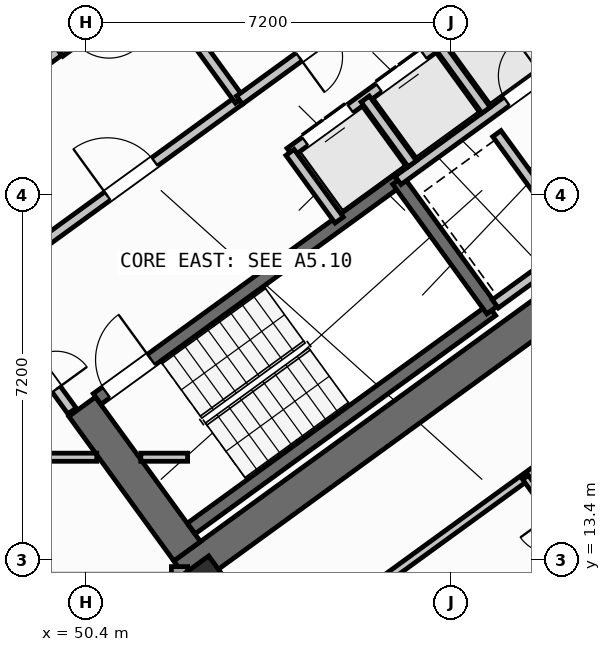
"""IFC4 building model, lengths in metres.
Left out: names, types, materials, properties, quantities, classifications, styles, units other than length and angle.
Written with IfcOpenShell. Run it as: python <this file> out.ifc"""

import sys

from ifc_helpers import new_model, si_unit, direction, frame, frame_2d, origin, origin_2d, place, context, subcontext, project, spatial, rectangle, hollow_rectangle, extrude, source, transform, mapped, element, fill, save


model = new_model("IFC4")
c1 = context("Model", 3, precision=1e-05, world=origin(), true_north=direction((0.0, 1.0)))
c2 = subcontext(c1, "Body", "Model", "MODEL_VIEW")
j1 = project(units=[si_unit("LENGTHUNIT", "METRE"), si_unit("PLANEANGLEUNIT", "RADIAN")], contexts=[c1])
p1 = place(None, origin())
s1 = spatial("IfcSite", under=j1, at=p1, CompositionType="ELEMENT")
p2 = place(p1, origin())
s2 = spatial("IfcBuilding", under=s1, at=p2, CompositionType="ELEMENT")
p3 = place(p2, frame((0.0, 0.0, 52.8)))
s3 = spatial("IfcBuildingStorey", under=s2, at=p3, CompositionType="ELEMENT", Elevation=52.8)
p4 = place(p3, frame((52.318, 13.11, 0.0), z_axis=(0.0, 0.0, 1.0), x_axis=(0.809019445368, 0.587781878776, 0.0)))
e1 = element("IfcWall", 1, at=p4, inside=s3, PredefinedType="SHEAR", context=c2, shape_type="SweptSolid", body=[
    extrude(rectangle(XDim=12.44, YDim=0.65, at=frame_2d((6.22, 0.0))), origin(), (0.0, 0.0, 1.0), 3.35),
])
p5 = place(p3, frame((52.39, 13.564, 0.0), z_axis=(0.0, 0.0, 1.0), x_axis=(-0.58779688989, 0.809008539037, 0.0)))
e2 = element("IfcWall", 2, at=p5, inside=s3, PredefinedType="SHEAR", context=c2, shape_type="SweptSolid", body=[
    extrude(rectangle(XDim=3.525, YDim=0.65, at=frame_2d((1.763, 0.0))), origin(), (0.0, 0.0, 1.0), 3.35),
])
m1 = source(origin(), c2, "Body", "SweptSolid", [
    extrude(hollow_rectangle(XDim=1.0, YDim=1.0, WallThickness=0.04, at=origin_2d()), origin(), (0.0, 0.0, 1.0), 3.6),
])
p6 = place(p3, frame((52.705, 12.773, 0.0), z_axis=(0.0, 0.0, 1.0), x_axis=(0.809016994375, 0.587785252292, 0.0)))
e3 = element("IfcColumn", 3, at=p6, inside=s3, PredefinedType="COLUMN", context=c2, shape_type="MappedRepresentation", body=[
    mapped(m1, transform((0.0, 0.0, 0.0), scale=1.0)),
])
p7 = place(p3, frame((58.455, 35.484, 0.0), z_axis=(0.0, 0.0, 1.0), x_axis=(0.587783625747, -0.809018176127, 0.0)))
e4 = element("IfcWall", 4, at=p7, inside=s3, PredefinedType="STANDARD", context=c2, shape_type="SweptSolid", body=[
    extrude(rectangle(XDim=21.587, YDim=0.32, at=frame_2d((10.794, 0.0))), origin(), (0.0, 0.0, 1.0), 2.725),
])
p8 = place(p7, frame((1.5, 0.0, 0.8)))
e5 = element("IfcOpeningElement", 5, at=p8, cuts=e4, PredefinedType="OPENING", context=c2, shape_type="SweptSolid", body=[
    extrude(rectangle(XDim=2.1, YDim=1.55, at=frame_2d((1.05, 0.775))), frame((0.0, 0.17, 0.0), z_axis=(0.0, -1.0, 0.0), x_axis=(1.0, 0.0, 0.0)), (0.0, 0.0, 1.0), 0.34),
])
p9 = place(p7, frame((5.105, 0.0, 0.85)))
e6 = element("IfcOpeningElement", 6, at=p9, cuts=e4, PredefinedType="OPENING", context=c2, shape_type="SweptSolid", body=[
    extrude(rectangle(XDim=1.5, YDim=1.5, at=frame_2d((0.75, 0.75))), frame((0.0, 0.17, 0.0), z_axis=(0.0, -1.0, 0.0), x_axis=(1.0, 0.0, 0.0)), (0.0, 0.0, 1.0), 0.34),
])
p10 = place(p7, frame((8.954, 0.0, 0.85)))
e7 = element("IfcOpeningElement", 7, at=p10, cuts=e4, PredefinedType="OPENING", context=c2, shape_type="SweptSolid", body=[
    extrude(rectangle(XDim=1.5, YDim=1.5, at=frame_2d((0.75, 0.75))), frame((0.0, 0.17, 0.0), z_axis=(0.0, -1.0, 0.0), x_axis=(1.0, 0.0, 0.0)), (0.0, 0.0, 1.0), 0.34),
])
p11 = place(p7, frame((17.581, 0.0, 0.95)))
e8 = element("IfcOpeningElement", 8, at=p11, cuts=e4, PredefinedType="OPENING", context=c2, shape_type="SweptSolid", body=[
    extrude(rectangle(XDim=1.2, YDim=1.4, at=frame_2d((0.6, 0.7))), frame((0.0, 0.17, 0.0), z_axis=(0.0, -1.0, 0.0), x_axis=(1.0, 0.0, 0.0)), (0.0, 0.0, 1.0), 0.34),
])
p12 = place(p3, frame((71.098, 17.731, 0.0), z_axis=(0.0, 0.0, 1.0), x_axis=(-0.809021120468, -0.587779573171, 0.0)))
e9 = element("IfcWall", 9, at=p12, inside=s3, PredefinedType="STANDARD", context=c2, shape_type="SweptSolid", body=[
    extrude(rectangle(XDim=17.588, YDim=0.32, at=frame_2d((8.794, 0.0))), origin(), (0.0, 0.0, 1.0), 3.35),
])
p13 = place(p12, frame((1.624, 0.0, 0.0)))
e10 = element("IfcOpeningElement", 10, at=p13, cuts=e9, PredefinedType="OPENING", context=c2, shape_type="SweptSolid", body=[
    extrude(rectangle(XDim=1.05, YDim=2.15, at=frame_2d((0.525, 1.075))), frame((0.0, 0.17, 0.0), z_axis=(0.0, -1.0, 0.0), x_axis=(1.0, 0.0, 0.0)), (0.0, 0.0, 1.0), 0.34),
])
p14 = place(p12, frame((4.104, 0.0, 1.0)))
e11 = element("IfcOpeningElement", 11, at=p14, cuts=e9, PredefinedType="OPENING", context=c2, shape_type="SweptSolid", body=[
    extrude(rectangle(XDim=0.9, YDim=1.25, at=frame_2d((0.45, 0.625))), frame((0.0, 0.17, 0.0), z_axis=(0.0, -1.0, 0.0), x_axis=(1.0, 0.0, 0.0)), (0.0, 0.0, 1.0), 0.34),
])
p15 = place(p12, frame((7.879, 0.0, 0.85)))
e12 = element("IfcOpeningElement", 12, at=p15, cuts=e9, PredefinedType="OPENING", context=c2, shape_type="SweptSolid", body=[
    extrude(rectangle(XDim=1.8, YDim=1.5, at=frame_2d((0.9, 0.75))), frame((0.0, 0.17, 0.0), z_axis=(0.0, -1.0, 0.0), x_axis=(1.0, 0.0, 0.0)), (0.0, 0.0, 1.0), 0.34),
])
p16 = place(p12, frame((12.849, 0.0, 0.85)))
e13 = element("IfcOpeningElement", 13, at=p16, cuts=e9, PredefinedType="OPENING", context=c2, shape_type="SweptSolid", body=[
    extrude(rectangle(XDim=1.8, YDim=1.5, at=frame_2d((0.9, 0.75))), frame((0.0, 0.17, 0.0), z_axis=(0.0, -1.0, 0.0), x_axis=(1.0, 0.0, 0.0)), (0.0, 0.0, 1.0), 0.34),
])
p17 = place(p3, frame((52.24, 13.261, 0.0), z_axis=(0.0, 0.0, 1.0), x_axis=(0.0, -1.0, 0.0)))
e14 = element("IfcWall", 14, at=p17, inside=s3, PredefinedType="STANDARD", context=c2, shape_type="SweptSolid", body=[
    extrude(rectangle(XDim=9.795, YDim=0.32, at=frame_2d((4.897, 0.0))), origin(), (0.0, 0.0, 1.0), 3.35),
])
p18 = place(p17, frame((2.349, 0.0, 0.8)))
e15 = element("IfcOpeningElement", 15, at=p18, cuts=e14, PredefinedType="OPENING", context=c2, shape_type="SweptSolid", body=[
    extrude(rectangle(XDim=2.1, YDim=1.55, at=frame_2d((1.05, 0.775))), frame((0.0, 0.17, 0.0), z_axis=(0.0, -1.0, 0.0), x_axis=(1.0, 0.0, 0.0)), (0.0, 0.0, 1.0), 0.34),
])
p19 = place(p17, frame((7.03, 0.0, 0.85)))
e16 = element("IfcOpeningElement", 16, at=p19, cuts=e14, PredefinedType="OPENING", context=c2, shape_type="SweptSolid", body=[
    extrude(rectangle(XDim=1.8, YDim=1.5, at=frame_2d((0.9, 0.75))), frame((0.0, 0.17, 0.0), z_axis=(0.0, -1.0, 0.0), x_axis=(1.0, 0.0, 0.0)), (0.0, 0.0, 1.0), 0.34),
])
p20 = place(p3, frame((49.863, 23.44, 0.0), z_axis=(0.0, 0.0, 1.0), x_axis=(0.809003474932, 0.587803859759, 0.0)))
e17 = element("IfcWall", 17, at=p20, inside=s3, PredefinedType="SHEAR", context=c2, shape_type="SweptSolid", body=[
    extrude(rectangle(XDim=7.46, YDim=0.26, at=frame_2d((3.73, 0.0))), origin(), (0.0, 0.0, 1.0), 3.35),
])
p21 = place(p20, frame((0.36, 0.0, 0.0)))
e18 = element("IfcOpeningElement", 18, at=p21, cuts=e17, PredefinedType="OPENING", context=c2, shape_type="SweptSolid", body=[
    extrude(rectangle(XDim=0.86, YDim=2.05, at=frame_2d((0.43, 1.025))), frame((0.0, 0.14, 0.0), z_axis=(0.0, -1.0, 0.0), x_axis=(1.0, 0.0, 0.0)), (0.0, 0.0, 1.0), 0.28),
])
p22 = place(p3, frame((49.855, 23.434, 0.0), z_axis=(0.0, 0.0, 1.0), x_axis=(-0.58776738483, 0.809029975545, 0.0)))
e19 = element("IfcWall", 19, at=p22, inside=s3, PredefinedType="SHEAR", context=c2, shape_type="SweptSolid", body=[
    extrude(rectangle(XDim=3.16, YDim=0.26, at=frame_2d((1.58, 0.0))), origin(), (0.0, 0.0, 1.0), 3.35),
])
p23 = place(p3, frame((52.472, 14.013, 0.0), z_axis=(0.0, 0.0, 1.0), x_axis=(0.809028366311, 0.587769599847, 0.0)))
e20 = element("IfcWall", 20, at=p23, inside=s3, PredefinedType="SHEAR", context=c2, shape_type="SweptSolid", body=[
    extrude(rectangle(XDim=7.33, YDim=0.26, at=frame_2d((3.665, 0.0))), origin(), (0.0, 0.0, 1.0), 3.35),
])
p24 = place(p3, frame((50.615, 16.57, 0.0), z_axis=(0.0, 0.0, 1.0), x_axis=(0.809028366311, 0.587769599847, 0.0)))
e21 = element("IfcWall", 21, at=p24, inside=s3, PredefinedType="SHEAR", context=c2, shape_type="SweptSolid", body=[
    extrude(rectangle(XDim=7.33, YDim=0.26, at=frame_2d((3.665, 0.0))), origin(), (0.0, 0.0, 1.0), 3.35),
])
p25 = place(p24, frame((0.22, 0.0, 0.0)))
e22 = element("IfcOpeningElement", 22, at=p25, cuts=e21, PredefinedType="OPENING", context=c2, shape_type="SweptSolid", body=[
    extrude(rectangle(XDim=1.1, YDim=2.1, at=frame_2d((0.55, 1.05))), frame((0.0, 0.14, 0.0), z_axis=(0.0, -1.0, 0.0), x_axis=(1.0, 0.0, 0.0)), (0.0, 0.0, 1.0), 0.28),
])
p26 = place(p3, frame((58.41, 18.327, 0.0), z_axis=(0.0, 0.0, 1.0), x_axis=(-0.58776738483, 0.809029975545, 0.0)))
e23 = element("IfcWall", 23, at=p26, inside=s3, PredefinedType="SHEAR", context=c2, shape_type="SweptSolid", body=[
    extrude(rectangle(XDim=3.16, YDim=0.26, at=frame_2d((1.58, 0.0))), origin(), (0.0, 0.0, 1.0), 3.35),
])
p27 = place(p3, frame((47.106, 21.437, 0.0), z_axis=(0.0, 0.0, 1.0), x_axis=(0.809012514015, 0.58779141893, 0.0)))
e24 = element("IfcWall", 24, at=p27, inside=s3, PredefinedType="STANDARD", context=c2, shape_type="SweptSolid", body=[
    extrude(rectangle(XDim=3.398, YDim=0.2, at=frame_2d((1.699, 0.0))), origin(), (0.0, 0.0, 1.0), 3.34),
])
p28 = place(p27, frame((0.408, 0.0, 0.0)))
e25 = element("IfcOpeningElement", 25, at=p28, cuts=e24, PredefinedType="OPENING", context=c2, shape_type="SweptSolid", body=[
    extrude(rectangle(XDim=1.3, YDim=2.2, at=frame_2d((0.65, 1.1))), frame((0.0, 0.11, 0.0), z_axis=(0.0, -1.0, 0.0), x_axis=(1.0, 0.0, 0.0)), (0.0, 0.0, 1.0), 0.22),
])
p29 = place(p3, frame((48.799, 19.107, 0.0), z_axis=(0.0, 0.0, 1.0), x_axis=(0.809012959416, 0.587790805897, 0.0)))
e26 = element("IfcWall", 26, at=p29, inside=s3, PredefinedType="STANDARD", context=c2, shape_type="SweptSolid", body=[
    extrude(rectangle(XDim=5.718, YDim=0.2, at=frame_2d((2.859, 0.0))), origin(), (0.0, 0.0, 1.0), 3.34),
])
p30 = place(p29, frame((2.498, 0.0, 0.0)))
e27 = element("IfcOpeningElement", 27, at=p30, cuts=e26, PredefinedType="OPENING", context=c2, shape_type="SweptSolid", body=[
    extrude(rectangle(XDim=1.15, YDim=2.1, at=frame_2d((0.575, 1.05))), frame((0.0, 0.11, 0.0), z_axis=(0.0, -1.0, 0.0), x_axis=(1.0, 0.0, 0.0)), (0.0, 0.0, 1.0), 0.22),
])
p31 = place(p3, frame((56.553, 20.884, 0.0), z_axis=(0.0, 0.0, 1.0), x_axis=(0.809035789462, 0.587759382205, 0.0)))
e28 = element("IfcWall", 28, at=p31, inside=s3, PredefinedType="STANDARD", context=c2, shape_type="SweptSolid", body=[
    extrude(rectangle(XDim=3.768, YDim=0.2, at=frame_2d((1.884, 0.0))), origin(), (0.0, 0.0, 1.0), 3.34),
])
p32 = place(p31, frame((2.65, 0.0, 0.0)))
e29 = element("IfcOpeningElement", 29, at=p32, cuts=e28, PredefinedType="OPENING", context=c2, shape_type="SweptSolid", body=[
    extrude(rectangle(XDim=0.86, YDim=2.05, at=frame_2d((0.43, 1.025))), frame((0.0, 0.11, 0.0), z_axis=(0.0, -1.0, 0.0), x_axis=(1.0, 0.0, 0.0)), (0.0, 0.0, 1.0), 0.22),
])
p33 = place(p3, frame((54.421, 21.436, 0.0), z_axis=(0.0, 0.0, 1.0), x_axis=(0.809013710463, 0.587789772183, 0.0)))
e30 = element("IfcWall", 30, at=p33, inside=s3, PredefinedType="STANDARD", context=c2, shape_type="SweptSolid", body=[
    extrude(rectangle(XDim=5.36, YDim=0.2, at=frame_2d((2.68, 0.0))), origin(), (0.0, 0.0, 1.0), 3.34),
])
p34 = place(p33, frame((0.37, 0.0, 0.0)))
e31 = element("IfcOpeningElement", 31, at=p34, cuts=e30, PredefinedType="OPENING", context=c2, shape_type="SweptSolid", body=[
    extrude(rectangle(XDim=1.1, YDim=2.15, at=frame_2d((0.55, 1.075))), frame((0.0, 0.11, 0.0), z_axis=(0.0, -1.0, 0.0), x_axis=(1.0, 0.0, 0.0)), (0.0, 0.0, 1.0), 0.22),
])
p35 = place(p33, frame((2.17, 0.0, 0.0)))
e32 = element("IfcOpeningElement", 32, at=p35, cuts=e30, PredefinedType="OPENING", context=c2, shape_type="SweptSolid", body=[
    extrude(rectangle(XDim=1.1, YDim=2.15, at=frame_2d((0.55, 1.075))), frame((0.0, 0.11, 0.0), z_axis=(0.0, -1.0, 0.0), x_axis=(1.0, 0.0, 0.0)), (0.0, 0.0, 1.0), 0.22),
])
p36 = place(p33, frame((3.97, 0.0, 0.0)))
e33 = element("IfcOpeningElement", 33, at=p36, cuts=e30, PredefinedType="OPENING", context=c2, shape_type="SweptSolid", body=[
    extrude(rectangle(XDim=1.1, YDim=2.15, at=frame_2d((0.55, 1.075))), frame((0.0, 0.11, 0.0), z_axis=(0.0, -1.0, 0.0), x_axis=(1.0, 0.0, 0.0)), (0.0, 0.0, 1.0), 0.22),
])
p37 = place(p3, frame((55.391, 20.102, 0.0), z_axis=(0.0, 0.0, 1.0), x_axis=(-0.58778447739, 0.809017557374, 0.0)))
e34 = element("IfcWall", 34, at=p37, inside=s3, PredefinedType="STANDARD", context=c2, shape_type="SweptSolid", body=[
    extrude(rectangle(XDim=1.65, YDim=0.2, at=frame_2d((0.825, 0.0))), origin(), (0.0, 0.0, 1.0), 3.34),
])
p38 = place(p3, frame((56.834, 21.212, 0.0), z_axis=(0.0, 0.0, 1.0), x_axis=(-0.58776738483, 0.809029975545, 0.0)))
e35 = element("IfcWall", 35, at=p38, inside=s3, PredefinedType="STANDARD", context=c2, shape_type="SweptSolid", body=[
    extrude(rectangle(XDim=1.58, YDim=0.2, at=frame_2d((0.79, 0.0))), origin(), (0.0, 0.0, 1.0), 3.34),
])
p39 = place(p3, frame((58.29, 22.27, 0.0), z_axis=(0.0, 0.0, 1.0), x_axis=(-0.587840865826, 0.808976585857, 0.0)))
e36 = element("IfcWall", 36, at=p39, inside=s3, PredefinedType="STANDARD", context=c2, shape_type="SweptSolid", body=[
    extrude(rectangle(XDim=1.58, YDim=0.2, at=frame_2d((0.79, 0.0))), origin(), (0.0, 0.0, 1.0), 3.34),
])
p40 = place(p3, frame((60.067, 19.655, 0.0), z_axis=(0.0, 0.0, 1.0), x_axis=(-0.587800520745, 0.809005900975, 0.0)))
e37 = element("IfcWall", 37, at=p40, inside=s3, PredefinedType="STANDARD", context=c2, shape_type="SweptSolid", body=[
    extrude(rectangle(XDim=2.66, YDim=0.2, at=frame_2d((1.33, 0.0))), origin(), (0.0, 0.0, 1.0), 3.34),
])
p41 = place(p3, frame((58.472, 18.447, 0.0), z_axis=(0.0, 0.0, 1.0), x_axis=(0.809022487728, 0.587777691266, 0.0)))
e38 = element("IfcWall", 38, at=p41, inside=s3, PredefinedType="STANDARD", context=c2, shape_type="SweptSolid", body=[
    extrude(rectangle(XDim=3.648, YDim=0.2, at=frame_2d((1.824, 0.0))), origin(), (0.0, 0.0, 1.0), 3.34),
])
p42 = place(p3, frame((53.425, 22.468, 0.0), z_axis=(0.0, 0.0, 1.0), x_axis=(-0.5877230039, 0.809062216821, 0.0)))
e39 = element("IfcWall", 39, at=p42, inside=s3, PredefinedType="STANDARD", context=c2, shape_type="SweptSolid", body=[
    extrude(rectangle(XDim=2.88, YDim=0.2, at=frame_2d((1.44, 0.0))), origin(), (0.0, 0.0, 1.0), 3.34),
])
p43 = place(p3, frame((53.425, 22.468, 0.0), z_axis=(0.0, 0.0, 1.0), x_axis=(0.80902705128, 0.587771409902, 0.0)))
e40 = element("IfcWall", 40, at=p43, inside=s3, PredefinedType="STANDARD", context=c2, shape_type="SweptSolid", body=[
    extrude(rectangle(XDim=5.368, YDim=0.2, at=frame_2d((2.684, 0.0))), origin(), (0.0, 0.0, 1.0), 3.34),
])
p44 = place(p43, frame((4.28, 0.0, 0.0)))
e41 = element("IfcOpeningElement", 41, at=p44, cuts=e40, PredefinedType="OPENING", context=c2, shape_type="SweptSolid", body=[
    extrude(rectangle(XDim=0.86, YDim=2.05, at=frame_2d((0.43, 1.025))), frame((0.0, 0.11, 0.0), z_axis=(0.0, -1.0, 0.0), x_axis=(1.0, 0.0, 0.0)), (0.0, 0.0, 1.0), 0.22),
])
p45 = place(p43, frame((1.45, 0.0, 0.0)))
e42 = element("IfcOpeningElement", 42, at=p45, cuts=e40, PredefinedType="OPENING", context=c2, shape_type="SweptSolid", body=[
    extrude(rectangle(XDim=0.86, YDim=2.05, at=frame_2d((0.43, 1.025))), frame((0.0, 0.11, 0.0), z_axis=(0.0, -1.0, 0.0), x_axis=(1.0, 0.0, 0.0)), (0.0, 0.0, 1.0), 0.22),
])
p46 = place(p3, frame((35.296, 15.42, 0.0), z_axis=(0.0, 0.0, 1.0), x_axis=(1.0, 0.0, 0.0)))
e43 = element("IfcWall", 43, at=p46, inside=s3, PredefinedType="PARTITIONING", context=c2, shape_type="SweptSolid", body=[
    extrude(rectangle(XDim=15.311, YDim=0.16, at=frame_2d((7.655, 0.0))), origin(), (0.0, 0.0, 1.0), 3.34),
])
p47 = place(p46, frame((0.615, 0.0, 0.0)))
e44 = element("IfcOpeningElement", 44, at=p47, cuts=e43, PredefinedType="OPENING", context=c2, shape_type="SweptSolid", body=[
    extrude(rectangle(XDim=1.0, YDim=2.1, at=frame_2d((0.5, 1.05))), frame((0.0, 0.09, 0.0), z_axis=(0.0, -1.0, 0.0), x_axis=(1.0, 0.0, 0.0)), (0.0, 0.0, 1.0), 0.18),
])
p48 = place(p46, frame((9.035, 0.0, 0.0)))
e45 = element("IfcOpeningElement", 45, at=p48, cuts=e43, PredefinedType="OPENING", context=c2, shape_type="SweptSolid", body=[
    extrude(rectangle(XDim=1.0, YDim=2.1, at=frame_2d((0.5, 1.05))), frame((0.0, 0.09, 0.0), z_axis=(0.0, -1.0, 0.0), x_axis=(1.0, 0.0, 0.0)), (0.0, 0.0, 1.0), 0.18),
])
p49 = place(p3, frame((51.477, 15.42, 0.0), z_axis=(0.0, 0.0, 1.0), x_axis=(1.0, 0.0, 0.0)))
e46 = element("IfcWall", 46, at=p49, inside=s3, PredefinedType="PARTITIONING", context=c2, shape_type="SweptSolid", body=[
    extrude(rectangle(XDim=0.923, YDim=0.16, at=frame_2d((0.461, 0.0))), origin(), (0.0, 0.0, 1.0), 3.34),
])
p50 = place(p3, frame((50.119, 16.333, 0.0), z_axis=(0.0, 0.0, 1.0), x_axis=(-0.587749856981, 0.809042709391, 0.0)))
e47 = element("IfcWall", 47, at=p50, inside=s3, PredefinedType="STANDARD", context=c2, shape_type="SweptSolid", body=[
    extrude(rectangle(XDim=2.96, YDim=0.2, at=frame_2d((1.48, 0.0))), origin(), (0.0, 0.0, 1.0), 3.34),
])
p51 = place(p50, frame((0.53, 0.0, 0.0)))
e48 = element("IfcOpeningElement", 48, at=p51, cuts=e47, PredefinedType="OPENING", context=c2, shape_type="SweptSolid", body=[
    extrude(rectangle(XDim=1.5, YDim=2.15, at=frame_2d((0.75, 1.075))), frame((0.0, 0.11, 0.0), z_axis=(0.0, -1.0, 0.0), x_axis=(1.0, 0.0, 0.0)), (0.0, 0.0, 1.0), 0.22),
])
p52 = place(p3, frame((59.827, 23.386, 0.0), z_axis=(0.0, 0.0, 1.0), x_axis=(-0.587803840107, 0.809003489211, 0.0)))
e49 = element("IfcWall", 49, at=p52, inside=s3, PredefinedType="STANDARD", context=c2, shape_type="SweptSolid", body=[
    extrude(rectangle(XDim=2.96, YDim=0.2, at=frame_2d((1.48, 0.0))), origin(), (0.0, 0.0, 1.0), 3.34),
])
p53 = place(p52, frame((1.68, 0.0, 0.0)))
e50 = element("IfcOpeningElement", 50, at=p53, cuts=e49, PredefinedType="OPENING", context=c2, shape_type="SweptSolid", body=[
    extrude(rectangle(XDim=1.0, YDim=2.1, at=frame_2d((0.5, 1.05))), frame((0.0, 0.11, 0.0), z_axis=(0.0, -1.0, 0.0), x_axis=(1.0, 0.0, 0.0)), (0.0, 0.0, 1.0), 0.22),
])
p54 = place(p3, frame((53.705, 11.126, 0.0), z_axis=(0.0, 0.0, 1.0), x_axis=(0.809014504436, 0.587788679384, 0.0)))
e51 = element("IfcWall", 51, at=p54, inside=s3, PredefinedType="PARTITIONING", context=c2, shape_type="SweptSolid", body=[
    extrude(rectangle(XDim=14.67, YDim=0.16, at=frame_2d((7.335, 0.0))), origin(), (0.0, 0.0, 1.0), 3.34),
])
p55 = place(p54, frame((10.2, 0.0, 0.0)))
e52 = element("IfcOpeningElement", 52, at=p55, cuts=e51, PredefinedType="OPENING", context=c2, shape_type="SweptSolid", body=[
    extrude(rectangle(XDim=1.0, YDim=2.1, at=frame_2d((0.5, 1.05))), frame((0.0, 0.09, 0.0), z_axis=(0.0, -1.0, 0.0), x_axis=(1.0, 0.0, 0.0)), (0.0, 0.0, 1.0), 0.18),
])
p56 = place(p3, frame((56.249, 9.785, 0.0), z_axis=(0.0, 0.0, 1.0), x_axis=(0.809011747655, 0.587792473715, 0.0)))
e53 = element("IfcWall", 53, at=p56, inside=s3, PredefinedType="PLUMBINGWALL", context=c2, shape_type="SweptSolid", body=[
    extrude(rectangle(XDim=13.4, YDim=0.14, at=frame_2d((6.7, 0.0))), origin(), (0.0, 0.0, 1.0), 3.34),
])
p57 = place(p56, frame((8.94, 0.0, 0.0)))
e54 = element("IfcOpeningElement", 54, at=p57, cuts=e53, PredefinedType="OPENING", context=c2, shape_type="SweptSolid", body=[
    extrude(rectangle(XDim=0.92, YDim=2.08, at=frame_2d((0.46, 1.04))), frame((0.0, 0.08, 0.0), z_axis=(0.0, -1.0, 0.0), x_axis=(1.0, 0.0, 0.0)), (0.0, 0.0, 1.0), 0.16),
])
p58 = place(p3, frame((60.585, 12.936, 0.0), z_axis=(0.0, 0.0, 1.0), x_axis=(-0.587772116736, 0.809026537752, 0.0)))
e55 = element("IfcWall", 55, at=p58, inside=s3, PredefinedType="PLUMBINGWALL", context=c2, shape_type="SweptSolid", body=[
    extrude(rectangle(XDim=2.58, YDim=0.14, at=frame_2d((1.29, 0.0))), origin(), (0.0, 0.0, 1.0), 3.34),
])
p59 = place(p58, frame((0.9, 0.0, 0.0)))
e56 = element("IfcOpeningElement", 56, at=p59, cuts=e55, PredefinedType="OPENING", context=c2, shape_type="SweptSolid", body=[
    extrude(rectangle(XDim=0.78, YDim=2.05, at=frame_2d((0.39, 1.025))), frame((0.0, 0.08, 0.0), z_axis=(0.0, -1.0, 0.0), x_axis=(1.0, 0.0, 0.0)), (0.0, 0.0, 1.0), 0.16),
])
m2 = source(origin(), c2, "Body", "SweptSolid", [
    extrude(rectangle(XDim=1.1, YDim=2.1, at=frame_2d((0.55, 1.05))), frame((0.0, 0.025, 0.0), z_axis=(0.0, -1.0, 0.0), x_axis=(1.0, 0.0, 0.0)), (0.0, 0.0, 1.0), 0.05),
])
p60 = place(p25, origin())
e57 = element("IfcDoor", 57, at=p60, inside=s3, OperationType="SINGLE_SWING_RIGHT", PredefinedType="DOOR", context=c2, shape_type="MappedRepresentation", body=[
    mapped(m2, transform((0.0, 0.0, 0.0), scale=1.0)),
])
fill(e22, e57)
m3 = source(origin(), c2, "Body", "SweptSolid", [
    extrude(rectangle(XDim=1.15, YDim=2.1, at=frame_2d((0.575, 1.05))), frame((0.0, 0.025, 0.0), z_axis=(0.0, -1.0, 0.0), x_axis=(1.0, 0.0, 0.0)), (0.0, 0.0, 1.0), 0.05),
])
p61 = place(p30, origin())
e58 = element("IfcDoor", 58, at=p61, inside=s3, OperationType="SINGLE_SWING_LEFT", PredefinedType="DOOR", context=c2, shape_type="MappedRepresentation", body=[
    mapped(m3, transform((0.0, 0.0, 0.0), scale=1.0)),
])
fill(e27, e58)
m4 = source(origin(), c2, "Body", "SweptSolid", [
    extrude(rectangle(XDim=1.1, YDim=2.15, at=frame_2d((0.55, 1.075))), frame((0.0, 0.025, 0.0), z_axis=(0.0, -1.0, 0.0), x_axis=(1.0, 0.0, 0.0)), (0.0, 0.0, 1.0), 0.05),
])
p62 = place(p34, origin())
e59 = element("IfcDoor", 59, at=p62, inside=s3, OperationType="DOUBLE_DOOR_SLIDING", PredefinedType="DOOR", context=c2, shape_type="MappedRepresentation", body=[
    mapped(m4, transform((0.0, 0.0, 0.0), scale=1.0)),
])
fill(e31, e59)
p63 = place(p35, origin())
e60 = element("IfcDoor", 60, at=p63, inside=s3, OperationType="DOUBLE_DOOR_SLIDING", PredefinedType="DOOR", context=c2, shape_type="MappedRepresentation", body=[
    mapped(m4, transform((0.0, 0.0, 0.0), scale=1.0)),
])
fill(e32, e60)
m5 = source(origin(), c2, "Body", "SweptSolid", [
    extrude(rectangle(XDim=0.86, YDim=2.05, at=frame_2d((0.43, 1.025))), frame((0.0, 0.025, 0.0), z_axis=(0.0, -1.0, 0.0), x_axis=(1.0, 0.0, 0.0)), (0.0, 0.0, 1.0), 0.05),
])
p64 = place(p32, origin())
e61 = element("IfcDoor", 61, at=p64, inside=s3, OperationType="SINGLE_SWING_RIGHT", PredefinedType="DOOR", context=c2, shape_type="MappedRepresentation", body=[
    mapped(m5, transform((0.0, 0.0, 0.0), scale=1.0)),
])
fill(e29, e61)
p65 = place(p45, frame((0.86, 0.0, 0.0), z_axis=(0.0, 0.0, 1.0), x_axis=(-1.0, 0.0, 0.0)))
e62 = element("IfcDoor", 62, at=p65, inside=s3, OperationType="SINGLE_SWING_RIGHT", PredefinedType="DOOR", context=c2, shape_type="MappedRepresentation", body=[
    mapped(m5, transform((0.0, 0.0, 0.0), scale=1.0)),
])
fill(e42, e62)
m6 = source(origin(), c2, "Body", "SweptSolid", [
    extrude(rectangle(XDim=1.5, YDim=2.15, at=frame_2d((0.75, 1.075))), frame((0.0, 0.025, 0.0), z_axis=(0.0, -1.0, 0.0), x_axis=(1.0, 0.0, 0.0)), (0.0, 0.0, 1.0), 0.05),
])
p66 = place(p51, frame((1.5, 0.0, 0.0), z_axis=(0.0, 0.0, 1.0), x_axis=(-1.0, 0.0, 0.0)))
e63 = element("IfcDoor", 63, at=p66, inside=s3, OperationType="DOUBLE_DOOR_SINGLE_SWING", PredefinedType="DOOR", context=c2, shape_type="MappedRepresentation", body=[
    mapped(m6, transform((0.0, 0.0, 0.0), scale=1.0)),
])
fill(e48, e63)
save(model, sys.argv[1])
